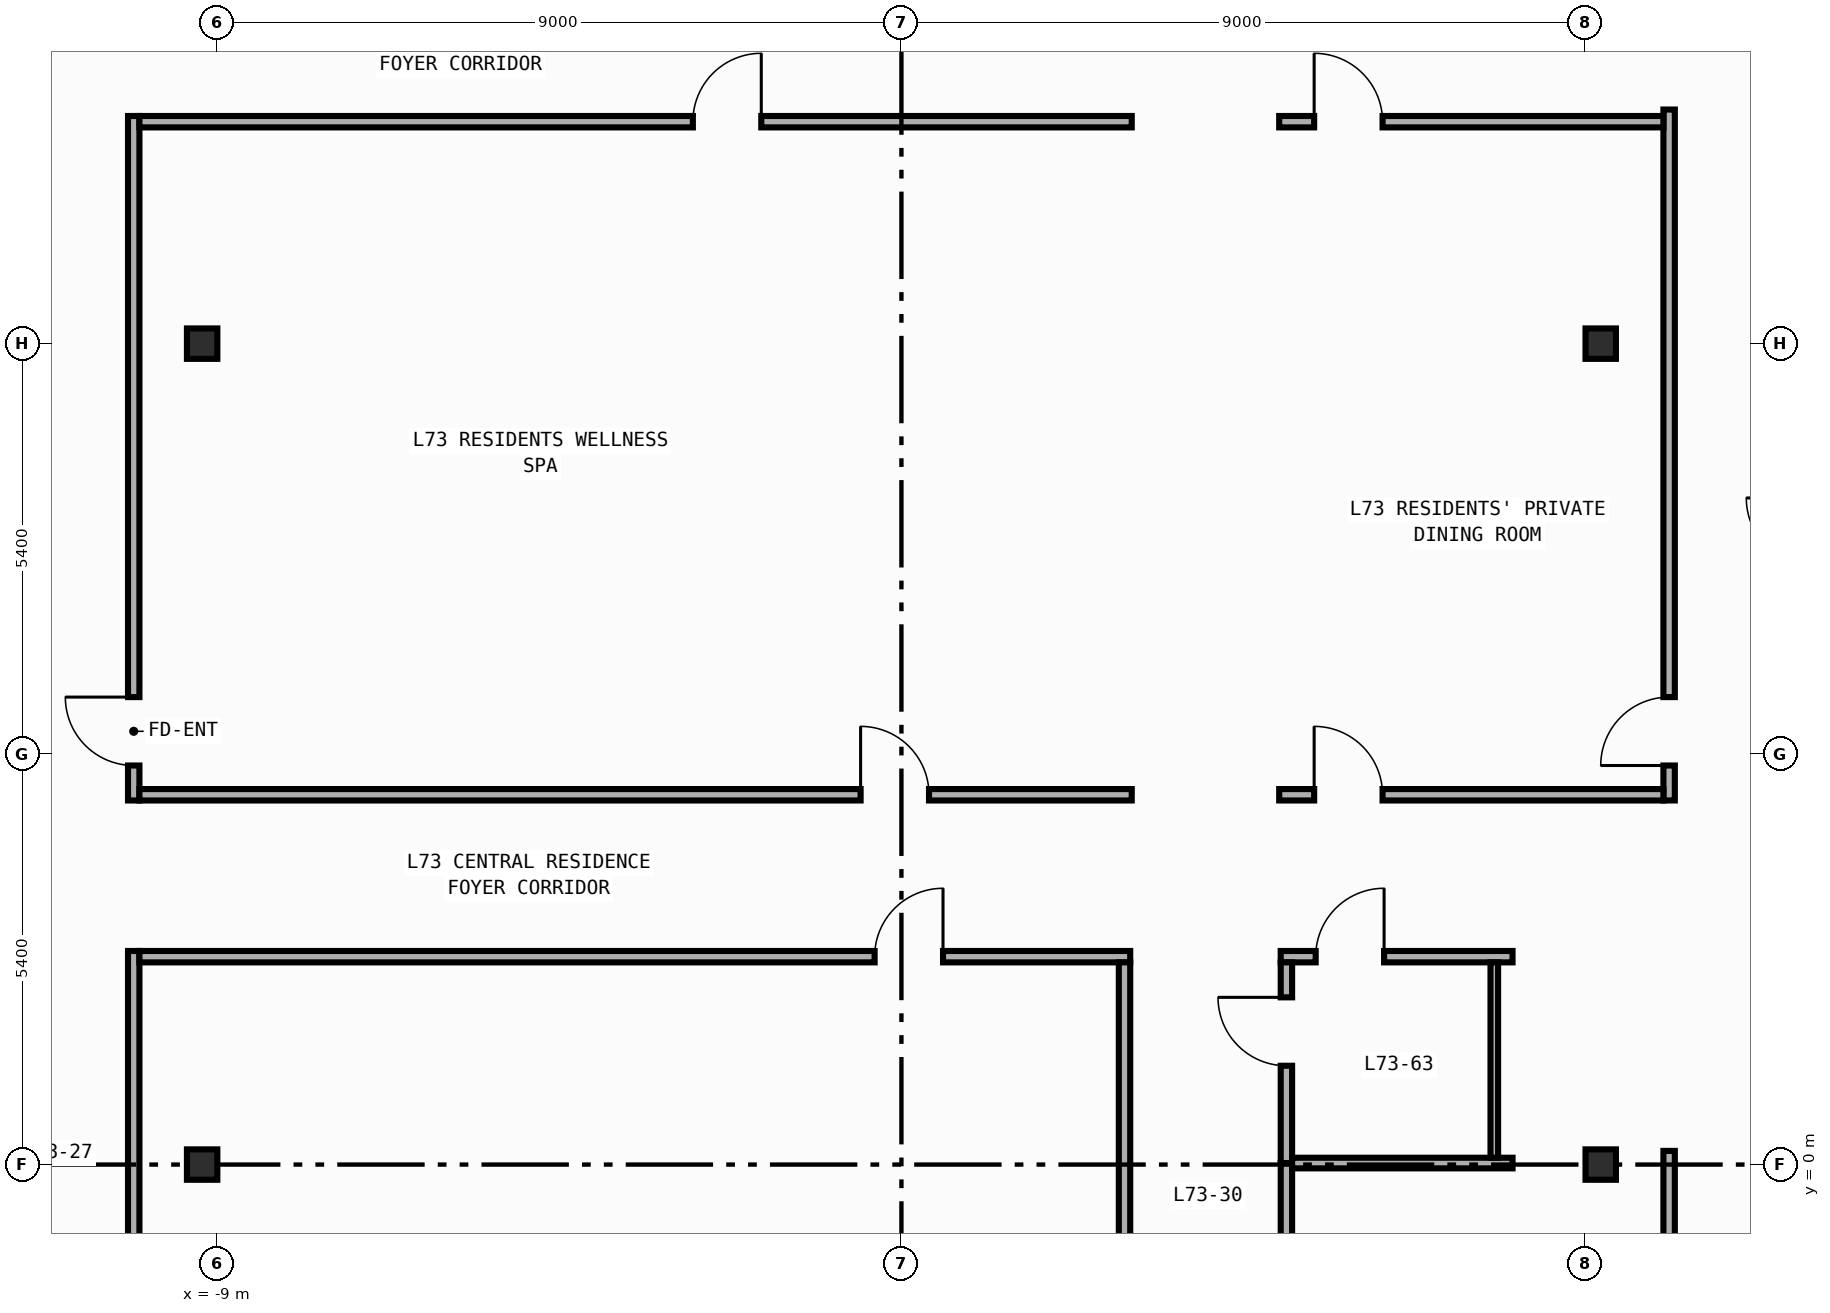
"""IFC4 building model, lengths in metres.
Left out: names, types, materials, properties, quantities, classifications, styles, units other than length and angle.
Written with IfcOpenShell. Run it as: python <this file> out.ifc"""

import sys

from ifc_helpers import new_model, si_unit, direction, frame, frame_2d, origin, origin_2d, place, context, subcontext, project, spatial, rectangle, i_section, extrude, element, fill, save


model = new_model("IFC4")
c1 = context("Model", 3, precision=1e-05, world=origin(), true_north=direction((0.0, 1.0)))
c2 = subcontext(c1, "Body", "Model", "MODEL_VIEW")
j1 = project(units=[si_unit("LENGTHUNIT", "METRE"), si_unit("PLANEANGLEUNIT", "RADIAN")], contexts=[c1])
p1 = place(None, origin())
s1 = spatial("IfcSite", under=j1, at=p1, CompositionType="ELEMENT")
p2 = place(p1, origin())
s2 = spatial("IfcBuilding", under=s1, at=p2, CompositionType="ELEMENT")
p3 = place(p2, frame((0.0, 0.0, 304.2)))
s3 = spatial("IfcBuildingStorey", under=s2, at=p3, CompositionType="ELEMENT", Elevation=304.2)
for number, where, z_axis, x_axis in (
    (1, (-9.2, 0.0, 0.0), (0.0, 0.0, 1.0), (1.0, 0.0, 0.0)),
    (2, (-9.2, 10.8, 0.0), (0.0, 0.0, 1.0), (1.0, 0.0, 0.0)),
    (3, (9.2, 0.0, 0.0), (0.0, 0.0, 1.0), (1.0, 0.0, 0.0)),
    (4, (9.2, 10.8, 0.0), (0.0, 0.0, 1.0), (1.0, 0.0, 0.0)),
):
    element("IfcColumn", number, at=place(p3, frame(where, z_axis=z_axis, x_axis=x_axis)), inside=s3, PredefinedType="COLUMN", context=c2, shape_type="SweptSolid", body=[
        extrude(i_section(OverallWidth=0.4, OverallDepth=0.4, WebThickness=0.013, FlangeThickness=0.021, FilletRadius=0.022, at=origin_2d()), origin(), (0.0, 0.0, 1.0), 3.8),
    ])
p4 = place(p3, frame((-10.1, 4.79, 0.0), z_axis=(0.0, 0.0, 1.0), x_axis=(0.0, 1.0, 0.0)))
e5 = element("IfcWall", 5, at=p4, inside=s3, PredefinedType="PARTITIONING", context=c2, shape_type="SweptSolid", body=[
    extrude(rectangle(XDim=9.005, YDim=0.15, at=frame_2d((4.502, 0.0))), origin(), (0.0, 0.0, 1.0), 3.54),
])
p5 = place(p4, frame((0.46, 0.0, 0.0)))
e6 = element("IfcOpeningElement", 6, at=p5, cuts=e5, PredefinedType="OPENING", context=c2, shape_type="SweptSolid", body=[
    extrude(rectangle(XDim=0.9, YDim=2.15, at=frame_2d((0.45, 1.075))), frame((0.0, 0.085, 0.0), z_axis=(0.0, -1.0, 0.0), x_axis=(1.0, 0.0, 0.0)), (0.0, 0.0, 1.0), 0.17),
])
p6 = place(p3, frame((-10.1, -13.795, 0.0), z_axis=(0.0, 0.0, 1.0), x_axis=(0.0, 1.0, 0.0)))
e7 = element("IfcWall", 7, at=p6, inside=s3, PredefinedType="PARTITIONING", context=c2, shape_type="SweptSolid", body=[
    extrude(rectangle(XDim=16.605, YDim=0.15, at=frame_2d((8.302, 0.0))), origin(), (0.0, 0.0, 1.0), 3.54),
])
p7 = place(p6, frame((7.954, 0.0, 0.0)))
e8 = element("IfcOpeningElement", 8, at=p7, cuts=e7, PredefinedType="OPENING", context=c2, shape_type="SweptSolid", body=[
    extrude(rectangle(XDim=0.9, YDim=2.15, at=frame_2d((0.45, 1.075))), frame((0.0, 0.085, 0.0), z_axis=(0.0, -1.0, 0.0), x_axis=(1.0, 0.0, 0.0)), (0.0, 0.0, 1.0), 0.17),
])
p8 = place(p3, frame((10.1, 4.79, 0.0), z_axis=(0.0, 0.0, 1.0), x_axis=(0.0, 1.0, 0.0)))
e9 = element("IfcWall", 9, at=p8, inside=s3, PredefinedType="PARTITIONING", context=c2, shape_type="SweptSolid", body=[
    extrude(rectangle(XDim=9.09, YDim=0.15, at=frame_2d((4.545, 0.0))), origin(), (0.0, 0.0, 1.0), 3.54),
])
p9 = place(p8, frame((0.46, 0.0, 0.0)))
e10 = element("IfcOpeningElement", 10, at=p9, cuts=e9, PredefinedType="OPENING", context=c2, shape_type="SweptSolid", body=[
    extrude(rectangle(XDim=0.9, YDim=2.15, at=frame_2d((0.45, 1.075))), frame((0.0, 0.085, 0.0), z_axis=(0.0, -1.0, 0.0), x_axis=(1.0, 0.0, 0.0)), (0.0, 0.0, 1.0), 0.17),
])
p10 = place(p3, frame((10.1, -13.795, 0.0), z_axis=(0.0, 0.0, 1.0), x_axis=(0.0, 1.0, 0.0)))
e11 = element("IfcWall", 11, at=p10, inside=s3, PredefinedType="PARTITIONING", context=c2, shape_type="SweptSolid", body=[
    extrude(rectangle(XDim=13.975, YDim=0.15, at=frame_2d((6.987, 0.0))), origin(), (0.0, 0.0, 1.0), 3.54),
])
p11 = place(p10, frame((7.956, 0.0, 0.0)))
e12 = element("IfcOpeningElement", 12, at=p11, cuts=e11, PredefinedType="OPENING", context=c2, shape_type="SweptSolid", body=[
    extrude(rectangle(XDim=0.9, YDim=2.15, at=frame_2d((0.45, 1.075))), frame((0.0, 0.085, 0.0), z_axis=(0.0, -1.0, 0.0), x_axis=(1.0, 0.0, 0.0)), (0.0, 0.0, 1.0), 0.17),
])
p12 = place(p3, frame((-10.025, 4.865, 0.0), z_axis=(0.0, 0.0, 1.0), x_axis=(1.0, 0.0, 0.0)))
e13 = element("IfcWall", 13, at=p12, inside=s3, PredefinedType="PARTITIONING", context=c2, shape_type="SweptSolid", body=[
    extrude(rectangle(XDim=13.055, YDim=0.15, at=frame_2d((6.527, 0.0))), origin(), (0.0, 0.0, 1.0), 3.54),
])
p13 = place(p12, frame((9.488, 0.0, 0.0)))
e14 = element("IfcOpeningElement", 14, at=p13, cuts=e13, PredefinedType="OPENING", context=c2, shape_type="SweptSolid", body=[
    extrude(rectangle(XDim=0.9, YDim=2.15, at=frame_2d((0.45, 1.075))), frame((0.0, 0.085, 0.0), z_axis=(0.0, -1.0, 0.0), x_axis=(1.0, 0.0, 0.0)), (0.0, 0.0, 1.0), 0.17),
])
p14 = place(p3, frame((-10.025, 2.735, 0.0), z_axis=(0.0, 0.0, 1.0), x_axis=(1.0, 0.0, 0.0)))
e15 = element("IfcWall", 15, at=p14, inside=s3, PredefinedType="PARTITIONING", context=c2, shape_type="SweptSolid", body=[
    extrude(rectangle(XDim=13.035, YDim=0.15, at=frame_2d((6.518, 0.0))), origin(), (0.0, 0.0, 1.0), 3.54),
])
p15 = place(p14, frame((9.672, 0.0, 0.0)))
e16 = element("IfcOpeningElement", 16, at=p15, cuts=e15, PredefinedType="OPENING", context=c2, shape_type="SweptSolid", body=[
    extrude(rectangle(XDim=0.9, YDim=2.15, at=frame_2d((0.45, 1.075))), frame((0.0, 0.085, 0.0), z_axis=(0.0, -1.0, 0.0), x_axis=(1.0, 0.0, 0.0)), (0.0, 0.0, 1.0), 0.17),
])
p16 = place(p3, frame((4.97, 4.865, 0.0), z_axis=(0.0, 0.0, 1.0), x_axis=(1.0, 0.0, 0.0)))
e17 = element("IfcWall", 17, at=p16, inside=s3, PredefinedType="PARTITIONING", context=c2, shape_type="SweptSolid", body=[
    extrude(rectangle(XDim=5.055, YDim=0.15, at=frame_2d((2.527, 0.0))), origin(), (0.0, 0.0, 1.0), 3.54),
])
p17 = place(p16, frame((0.46, 0.0, 0.0)))
e18 = element("IfcOpeningElement", 18, at=p17, cuts=e17, PredefinedType="OPENING", context=c2, shape_type="SweptSolid", body=[
    extrude(rectangle(XDim=0.9, YDim=2.15, at=frame_2d((0.45, 1.075))), frame((0.0, 0.085, 0.0), z_axis=(0.0, -1.0, 0.0), x_axis=(1.0, 0.0, 0.0)), (0.0, 0.0, 1.0), 0.17),
])
p18 = place(p3, frame((4.99, 2.735, 0.0), z_axis=(0.0, 0.0, 1.0), x_axis=(1.0, 0.0, 0.0)))
e19 = element("IfcWall", 19, at=p18, inside=s3, PredefinedType="PARTITIONING", context=c2, shape_type="SweptSolid", body=[
    extrude(rectangle(XDim=3.05, YDim=0.15, at=frame_2d((1.525, 0.0))), origin(), (0.0, 0.0, 1.0), 3.54),
])
p19 = place(p18, frame((0.46, 0.0, 0.0)))
e20 = element("IfcOpeningElement", 20, at=p19, cuts=e19, PredefinedType="OPENING", context=c2, shape_type="SweptSolid", body=[
    extrude(rectangle(XDim=0.9, YDim=2.15, at=frame_2d((0.45, 1.075))), frame((0.0, 0.085, 0.0), z_axis=(0.0, -1.0, 0.0), x_axis=(1.0, 0.0, 0.0)), (0.0, 0.0, 1.0), 0.17),
])
p20 = place(p3, frame((2.935, -13.795, 0.0), z_axis=(0.0, 0.0, 1.0), x_axis=(0.0, 1.0, 0.0)))
e21 = element("IfcWall", 21, at=p20, inside=s3, PredefinedType="PARTITIONING", context=c2, shape_type="SweptSolid", body=[
    extrude(rectangle(XDim=16.455, YDim=0.15, at=frame_2d((8.228, 0.0))), origin(), (0.0, 0.0, 1.0), 3.54),
])
p21 = place(p20, frame((7.878, 0.0, 0.0)))
e22 = element("IfcOpeningElement", 22, at=p21, cuts=e21, PredefinedType="OPENING", context=c2, shape_type="SweptSolid", body=[
    extrude(rectangle(XDim=0.9, YDim=2.15, at=frame_2d((0.45, 1.075))), frame((0.0, 0.085, 0.0), z_axis=(0.0, -1.0, 0.0), x_axis=(1.0, 0.0, 0.0)), (0.0, 0.0, 1.0), 0.17),
])
p22 = place(p3, frame((5.065, 0.02, 0.0), z_axis=(0.0, 0.0, 1.0), x_axis=(0.0, 1.0, 0.0)))
e23 = element("IfcWall", 23, at=p22, inside=s3, PredefinedType="PARTITIONING", context=c2, shape_type="SweptSolid", body=[
    extrude(rectangle(XDim=2.64, YDim=0.15, at=frame_2d((1.32, 0.0))), origin(), (0.0, 0.0, 1.0), 3.19),
])
p23 = place(p22, frame((1.28, 0.0, 0.0)))
e24 = element("IfcOpeningElement", 24, at=p23, cuts=e23, PredefinedType="OPENING", context=c2, shape_type="SweptSolid", body=[
    extrude(rectangle(XDim=0.9, YDim=2.15, at=frame_2d((0.45, 1.075))), frame((0.0, 0.085, 0.0), z_axis=(0.0, -1.0, 0.0), x_axis=(1.0, 0.0, 0.0)), (0.0, 0.0, 1.0), 0.17),
])
p24 = place(p3, frame((5.065, -13.795, 0.0), z_axis=(0.0, 0.0, 1.0), x_axis=(0.0, 1.0, 0.0)))
e25 = element("IfcWall", 25, at=p24, inside=s3, PredefinedType="PARTITIONING", context=c2, shape_type="SweptSolid", body=[
    extrude(rectangle(XDim=13.815, YDim=0.15, at=frame_2d((6.907, 0.0))), origin(), (0.0, 0.0, 1.0), 3.19),
])
p25 = place(p24, frame((7.982, 0.0, 0.0)))
e26 = element("IfcOpeningElement", 26, at=p25, cuts=e25, PredefinedType="OPENING", context=c2, shape_type="SweptSolid", body=[
    extrude(rectangle(XDim=0.9, YDim=2.15, at=frame_2d((0.45, 1.075))), frame((0.0, 0.085, 0.0), z_axis=(0.0, -1.0, 0.0), x_axis=(1.0, 0.0, 0.0)), (0.0, 0.0, 1.0), 0.17),
])
p26 = place(p3, frame((-10.025, 13.72, 0.0), z_axis=(0.0, 0.0, 1.0), x_axis=(1.0, 0.0, 0.0)))
e27 = element("IfcWall", 27, at=p26, inside=s3, PredefinedType="PARTITIONING", context=c2, shape_type="SweptSolid", body=[
    extrude(rectangle(XDim=13.055, YDim=0.15, at=frame_2d((6.527, 0.0))), origin(), (0.0, 0.0, 1.0), 3.54),
])
p27 = place(p26, frame((7.281, 0.0, 0.0)))
e28 = element("IfcOpeningElement", 28, at=p27, cuts=e27, PredefinedType="OPENING", context=c2, shape_type="SweptSolid", body=[
    extrude(rectangle(XDim=0.9, YDim=2.15, at=frame_2d((0.45, 1.075))), frame((0.0, 0.085, 0.0), z_axis=(0.0, -1.0, 0.0), x_axis=(1.0, 0.0, 0.0)), (0.0, 0.0, 1.0), 0.17),
])
p28 = place(p3, frame((4.97, 13.72, 0.0), z_axis=(0.0, 0.0, 1.0), x_axis=(1.0, 0.0, 0.0)))
e29 = element("IfcWall", 29, at=p28, inside=s3, PredefinedType="PARTITIONING", context=c2, shape_type="SweptSolid", body=[
    extrude(rectangle(XDim=5.055, YDim=0.15, at=frame_2d((2.527, 0.0))), origin(), (0.0, 0.0, 1.0), 3.54),
])
p29 = place(p28, frame((0.46, 0.0, 0.0)))
e30 = element("IfcOpeningElement", 30, at=p29, cuts=e29, PredefinedType="OPENING", context=c2, shape_type="SweptSolid", body=[
    extrude(rectangle(XDim=0.9, YDim=2.15, at=frame_2d((0.45, 1.075))), frame((0.0, 0.085, 0.0), z_axis=(0.0, -1.0, 0.0), x_axis=(1.0, 0.0, 0.0)), (0.0, 0.0, 1.0), 0.17),
])
p30 = place(p3, frame((5.14, 0.02, 0.0), z_axis=(0.0, 0.0, 1.0), x_axis=(1.0, 0.0, 0.0)))
e31 = element("IfcWall", 31, at=p30, inside=s3, PredefinedType="PARTITIONING", context=c2, shape_type="SweptSolid", body=[
    extrude(rectangle(XDim=2.9, YDim=0.14, at=frame_2d((1.45, 0.0))), origin(), (0.0, 0.0, 1.0), 2.64),
])
p31 = place(p3, frame((7.8, 2.66, 0.0), z_axis=(0.0, 0.0, 1.0), x_axis=(0.0, -1.0, 0.0)))
e32 = element("IfcWall", 32, at=p31, inside=s3, PredefinedType="PARTITIONING", context=c2, shape_type="SweptSolid", body=[
    extrude(rectangle(XDim=2.57, YDim=0.1, at=frame_2d((1.285, 0.0))), origin(), (0.0, 0.0, 1.0), 3.54),
])
p32 = place(p5, origin())
e33 = element("IfcDoor", 33, at=p32, inside=s3, OperationType="SINGLE_SWING_RIGHT", PredefinedType="DOOR", context=c2, shape_type="SweptSolid", body=[
    extrude(rectangle(XDim=0.9, YDim=2.15, at=frame_2d((0.45, 1.075))), frame((0.0, 0.025, 0.0), z_axis=(0.0, -1.0, 0.0), x_axis=(1.0, 0.0, 0.0)), (0.0, 0.0, 1.0), 0.05),
])
fill(e6, e33)
p33 = place(p9, origin())
e34 = element("IfcDoor", 34, at=p33, inside=s3, OperationType="SINGLE_SWING_LEFT", PredefinedType="DOOR", context=c2, shape_type="SweptSolid", body=[
    extrude(rectangle(XDim=0.9, YDim=2.15, at=frame_2d((0.45, 1.075))), frame((0.0, 0.025, 0.0), z_axis=(0.0, -1.0, 0.0), x_axis=(1.0, 0.0, 0.0)), (0.0, 0.0, 1.0), 0.05),
])
fill(e10, e34)
p34 = place(p13, origin())
e35 = element("IfcDoor", 35, at=p34, inside=s3, OperationType="SINGLE_SWING_LEFT", PredefinedType="DOOR", context=c2, shape_type="SweptSolid", body=[
    extrude(rectangle(XDim=0.9, YDim=2.15, at=frame_2d((0.45, 1.075))), frame((0.0, 0.025, 0.0), z_axis=(0.0, -1.0, 0.0), x_axis=(1.0, 0.0, 0.0)), (0.0, 0.0, 1.0), 0.05),
])
fill(e14, e35)
p35 = place(p15, origin())
e36 = element("IfcDoor", 36, at=p35, inside=s3, OperationType="SINGLE_SWING_RIGHT", PredefinedType="DOOR", context=c2, shape_type="SweptSolid", body=[
    extrude(rectangle(XDim=0.9, YDim=2.15, at=frame_2d((0.45, 1.075))), frame((0.0, 0.025, 0.0), z_axis=(0.0, -1.0, 0.0), x_axis=(1.0, 0.0, 0.0)), (0.0, 0.0, 1.0), 0.05),
])
fill(e16, e36)
p36 = place(p17, origin())
e37 = element("IfcDoor", 37, at=p36, inside=s3, OperationType="SINGLE_SWING_LEFT", PredefinedType="DOOR", context=c2, shape_type="SweptSolid", body=[
    extrude(rectangle(XDim=0.9, YDim=2.15, at=frame_2d((0.45, 1.075))), frame((0.0, 0.025, 0.0), z_axis=(0.0, -1.0, 0.0), x_axis=(1.0, 0.0, 0.0)), (0.0, 0.0, 1.0), 0.05),
])
fill(e18, e37)
p37 = place(p19, origin())
e38 = element("IfcDoor", 38, at=p37, inside=s3, OperationType="SINGLE_SWING_RIGHT", PredefinedType="DOOR", context=c2, shape_type="SweptSolid", body=[
    extrude(rectangle(XDim=0.9, YDim=2.15, at=frame_2d((0.45, 1.075))), frame((0.0, 0.025, 0.0), z_axis=(0.0, -1.0, 0.0), x_axis=(1.0, 0.0, 0.0)), (0.0, 0.0, 1.0), 0.05),
])
fill(e20, e38)
p38 = place(p23, origin())
e39 = element("IfcDoor", 39, at=p38, inside=s3, OperationType="SINGLE_SWING_RIGHT", PredefinedType="DOOR", context=c2, shape_type="SweptSolid", body=[
    extrude(rectangle(XDim=0.9, YDim=2.15, at=frame_2d((0.45, 1.075))), frame((0.0, 0.025, 0.0), z_axis=(0.0, -1.0, 0.0), x_axis=(1.0, 0.0, 0.0)), (0.0, 0.0, 1.0), 0.05),
])
fill(e24, e39)
p39 = place(p27, origin())
e40 = element("IfcDoor", 40, at=p39, inside=s3, OperationType="SINGLE_SWING_RIGHT", PredefinedType="DOOR", context=c2, shape_type="SweptSolid", body=[
    extrude(rectangle(XDim=0.9, YDim=2.15, at=frame_2d((0.45, 1.075))), frame((0.0, 0.025, 0.0), z_axis=(0.0, -1.0, 0.0), x_axis=(1.0, 0.0, 0.0)), (0.0, 0.0, 1.0), 0.05),
])
fill(e28, e40)
p40 = place(p29, origin())
e41 = element("IfcDoor", 41, at=p40, inside=s3, OperationType="SINGLE_SWING_LEFT", PredefinedType="DOOR", context=c2, shape_type="SweptSolid", body=[
    extrude(rectangle(XDim=0.9, YDim=2.15, at=frame_2d((0.45, 1.075))), frame((0.0, 0.025, 0.0), z_axis=(0.0, -1.0, 0.0), x_axis=(1.0, 0.0, 0.0)), (0.0, 0.0, 1.0), 0.05),
])
fill(e30, e41)
save(model, sys.argv[1])
